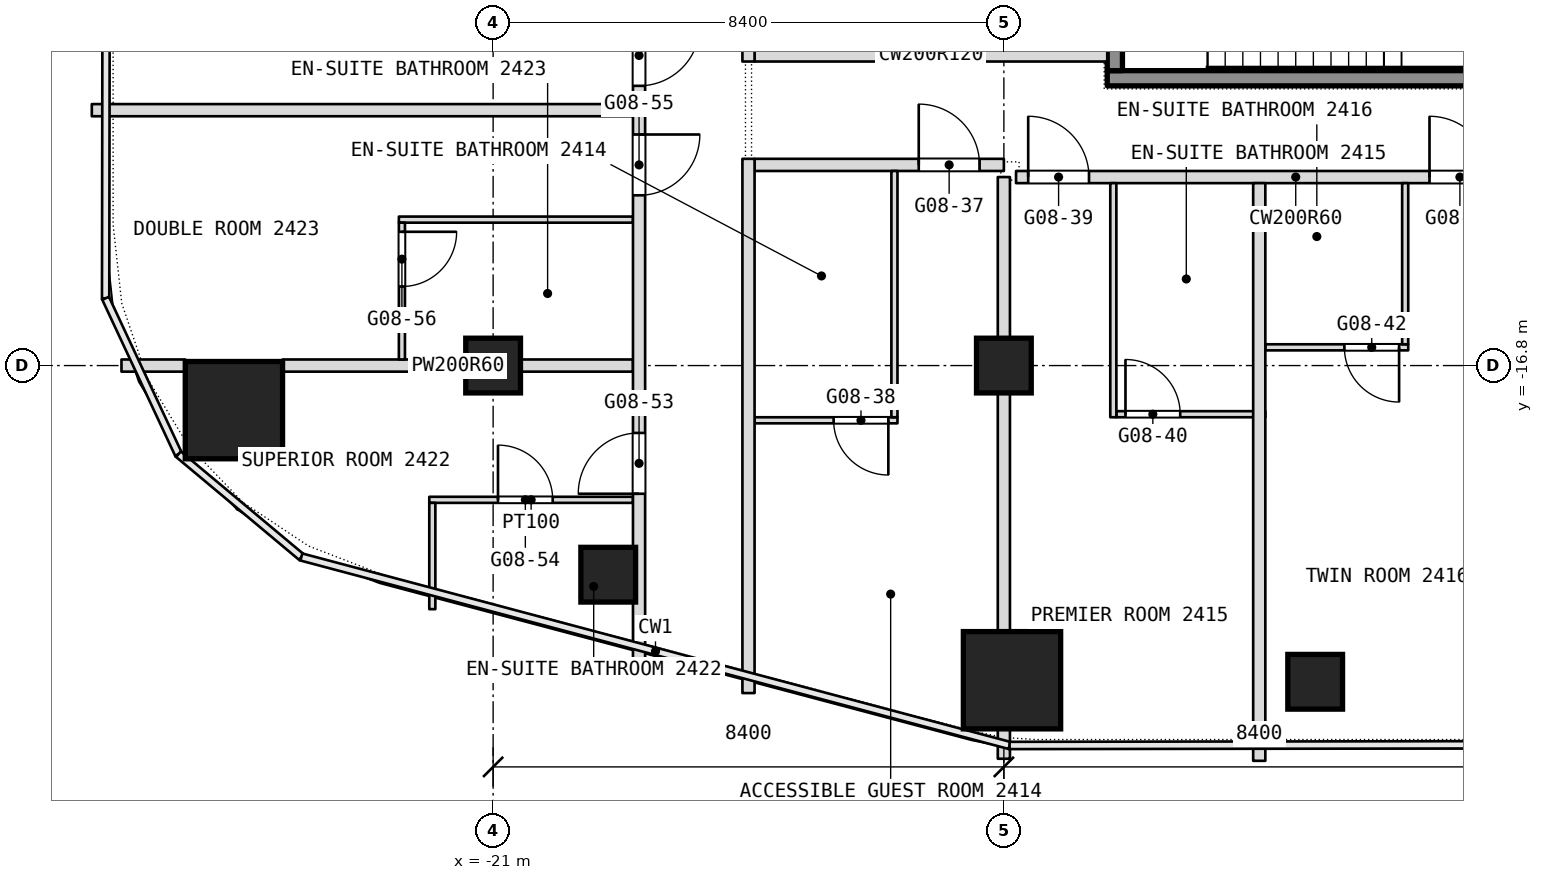
"""IFC4 building model, lengths in metres.
Left out: names, types, materials, properties, quantities, classifications, styles, units other than length and angle.
Written with IfcOpenShell. Run it as: python <this file> out.ifc"""

import sys

from ifc_helpers import new_model, si_unit, direction, frame, frame_2d, origin, origin_2d, place, context, subcontext, project, spatial, rectangle, extrude, element, fill, save


model = new_model("IFC4")
c1 = context("Model", 3, precision=1e-05, world=origin(), true_north=direction((0.0, 1.0)))
c2 = subcontext(c1, "Body", "Model", "MODEL_VIEW")
j1 = project(units=[si_unit("LENGTHUNIT", "METRE"), si_unit("PLANEANGLEUNIT", "RADIAN")], contexts=[c1])
p1 = place(None, origin())
s1 = spatial("IfcSite", under=j1, at=p1, CompositionType="ELEMENT")
p2 = place(p1, origin())
s2 = spatial("IfcBuilding", under=s1, at=p2, CompositionType="ELEMENT")
p3 = place(p2, frame((0.0, 0.0, 112.1)))
s3 = spatial("IfcBuildingStorey", under=s2, at=p3, CompositionType="ELEMENT", Elevation=112.1)
for number, where, z_axis, x_axis in (
    (1, (-25.263, -17.533, 0.0), (0.0, 0.0, 1.0), (1.0, 0.0, 0.0)),
    (2, (-12.466, -21.975, 0.0), (0.0, 0.0, 1.0), (1.0, 0.0, 0.0)),
):
    element("IfcColumn", number, at=place(p3, frame(where, z_axis=z_axis, x_axis=x_axis)), inside=s3, PredefinedType="COLUMN", context=c2, shape_type="SweptSolid", body=[
        extrude(rectangle(XDim=1.6, YDim=1.6, at=origin_2d()), origin(), (0.0, 0.0, 1.0), 3.6),
    ])
for number, where, z_axis, x_axis in (
    (3, (-21.0, -16.8, 0.0), (0.0, 0.0, 1.0), (1.0, 0.0, 0.0)),
    (4, (-12.6, -16.8, 0.0), (0.0, 0.0, 1.0), (1.0, 0.0, 0.0)),
    (5, (-7.48, -22.0, 0.0), (0.0, 0.0, 1.0), (1.0, 0.0, 0.0)),
    (6, (-19.107, -20.239, 0.0), (0.0, 0.0, 1.0), (1.0, 0.0, 0.0)),
):
    element("IfcColumn", number, at=place(p3, frame(where, z_axis=z_axis, x_axis=x_axis)), inside=s3, PredefinedType="COLUMN", context=c2, shape_type="SweptSolid", body=[
        extrude(rectangle(XDim=0.9, YDim=0.9, at=origin_2d()), origin(), (0.0, 0.0, 1.0), 3.6),
    ])
p4 = place(p3, frame((-22.05, -19.008, 0.0), z_axis=(0.0, 0.0, 1.0), x_axis=(1.0, 0.0, 0.0)))
e7 = element("IfcWall", 7, at=p4, inside=s3, PredefinedType="PARTITIONING", context=c2, shape_type="SweptSolid", body=[
    extrude(rectangle(XDim=3.35, YDim=0.1, at=frame_2d((1.675, 0.0))), origin(), (0.0, 0.0, 1.0), 3.34),
])
p5 = place(p4, frame((1.13, 0.0, 0.0)))
e8 = element("IfcOpeningElement", 8, at=p5, cuts=e7, PredefinedType="OPENING", context=c2, shape_type="SweptSolid", body=[
    extrude(rectangle(XDim=0.9, YDim=2.1, at=frame_2d((0.45, 1.05))), frame((0.0, 0.05, 0.0), z_axis=(0.0, -1.0, 0.0), x_axis=(1.0, 0.0, 0.0)), (0.0, 0.0, 1.0), 0.1),
])
p6 = place(p3, frame((-16.7, -17.7, 0.0), z_axis=(0.0, 0.0, 1.0), x_axis=(1.0, 0.0, 0.0)))
e9 = element("IfcWall", 9, at=p6, inside=s3, PredefinedType="PARTITIONING", context=c2, shape_type="SweptSolid", body=[
    extrude(rectangle(XDim=2.35, YDim=0.1, at=frame_2d((1.175, 0.0))), origin(), (0.0, 0.0, 1.0), 3.34),
])
p7 = place(p6, frame((1.3, 0.0, 0.0)))
e10 = element("IfcOpeningElement", 10, at=p7, cuts=e9, PredefinedType="OPENING", context=c2, shape_type="SweptSolid", body=[
    extrude(rectangle(XDim=0.9, YDim=2.1, at=frame_2d((0.45, 1.05))), frame((0.0, 0.05, 0.0), z_axis=(0.0, -1.0, 0.0), x_axis=(1.0, 0.0, 0.0)), (0.0, 0.0, 1.0), 0.1),
])
p8 = place(p3, frame((-10.75, -17.6, 0.0), z_axis=(0.0, 0.0, 1.0), x_axis=(1.0, 0.0, 0.0)))
e11 = element("IfcWall", 11, at=p8, inside=s3, PredefinedType="PARTITIONING", context=c2, shape_type="SweptSolid", body=[
    extrude(rectangle(XDim=2.45, YDim=0.1, at=frame_2d((1.225, 0.0))), origin(), (0.0, 0.0, 1.0), 3.34),
])
p9 = place(p8, frame((0.15, 0.0, 0.0)))
e12 = element("IfcOpeningElement", 12, at=p9, cuts=e11, PredefinedType="OPENING", context=c2, shape_type="SweptSolid", body=[
    extrude(rectangle(XDim=0.9, YDim=2.1, at=frame_2d((0.45, 1.05))), frame((0.0, 0.05, 0.0), z_axis=(0.0, -1.0, 0.0), x_axis=(1.0, 0.0, 0.0)), (0.0, 0.0, 1.0), 0.1),
])
p10 = place(p3, frame((-27.112, -16.8, 0.0), z_axis=(0.0, 0.0, 1.0), x_axis=(1.0, 0.0, 0.0)))
e13 = element("IfcWall", 13, at=p10, inside=s3, PredefinedType="PARTITIONING", context=c2, shape_type="SweptSolid", body=[
    extrude(rectangle(XDim=1.049, YDim=0.2, at=frame_2d((0.524, 0.0))), origin(), (0.0, 0.0, 1.0), 3.34),
])
p11 = place(p3, frame((-24.463, -16.8, 0.0), z_axis=(0.0, 0.0, 1.0), x_axis=(1.0, 0.0, 0.0)))
e14 = element("IfcWall", 14, at=p11, inside=s3, PredefinedType="PARTITIONING", context=c2, shape_type="SweptSolid", body=[
    extrude(rectangle(XDim=5.763, YDim=0.2, at=frame_2d((2.881, 0.0))), origin(), (0.0, 0.0, 1.0), 2.89),
])
p12 = place(p3, frame((-8.3, -16.5, 0.0), z_axis=(0.0, 0.0, 1.0), x_axis=(1.0, 0.0, 0.0)))
e15 = element("IfcWall", 15, at=p12, inside=s3, PredefinedType="PARTITIONING", context=c2, shape_type="SweptSolid", body=[
    extrude(rectangle(XDim=2.35, YDim=0.1, at=frame_2d((1.175, 0.0))), origin(), (0.0, 0.0, 1.0), 3.34),
])
p13 = place(p12, frame((1.3, 0.0, 0.0)))
e16 = element("IfcOpeningElement", 16, at=p13, cuts=e15, PredefinedType="OPENING", context=c2, shape_type="SweptSolid", body=[
    extrude(rectangle(XDim=0.9, YDim=2.1, at=frame_2d((0.45, 1.05))), frame((0.0, 0.05, 0.0), z_axis=(0.0, -1.0, 0.0), x_axis=(1.0, 0.0, 0.0)), (0.0, 0.0, 1.0), 0.1),
])
p14 = place(p3, frame((-22.55, -14.4, 0.0), z_axis=(0.0, 0.0, 1.0), x_axis=(1.0, 0.0, 0.0)))
e17 = element("IfcWall", 17, at=p14, inside=s3, PredefinedType="PARTITIONING", context=c2, shape_type="SweptSolid", body=[
    extrude(rectangle(XDim=3.85, YDim=0.1, at=frame_2d((1.925, 0.0))), origin(), (0.0, 0.0, 1.0), 3.34),
])
p15 = place(p3, frame((-12.4, -13.7, 0.0), z_axis=(0.0, 0.0, 1.0), x_axis=(1.0, 0.0, 0.0)))
e18 = element("IfcWall", 18, at=p15, inside=s3, PredefinedType="PARTITIONING", context=c2, shape_type="SweptSolid", body=[
    extrude(rectangle(XDim=9.2, YDim=0.2, at=frame_2d((4.6, 0.0))), origin(), (0.0, 0.0, 1.0), 3.34),
])
p16 = place(p15, frame((0.2, 0.0, 0.0)))
e19 = element("IfcOpeningElement", 19, at=p16, cuts=e18, PredefinedType="OPENING", context=c2, shape_type="SweptSolid", body=[
    extrude(rectangle(XDim=1.0, YDim=2.1, at=frame_2d((0.5, 1.05))), frame((0.0, 0.1, 0.0), z_axis=(0.0, -1.0, 0.0), x_axis=(1.0, 0.0, 0.0)), (0.0, 0.0, 1.0), 0.2),
])
p17 = place(p15, frame((6.8, 0.0, 0.0)))
e20 = element("IfcOpeningElement", 20, at=p17, cuts=e18, PredefinedType="OPENING", context=c2, shape_type="SweptSolid", body=[
    extrude(rectangle(XDim=1.0, YDim=2.1, at=frame_2d((0.5, 1.05))), frame((0.0, 0.1, 0.0), z_axis=(0.0, -1.0, 0.0), x_axis=(1.0, 0.0, 0.0)), (0.0, 0.0, 1.0), 0.2),
])
p18 = place(p3, frame((-16.7, -13.5, 0.0), z_axis=(0.0, 0.0, 1.0), x_axis=(1.0, 0.0, 0.0)))
e21 = element("IfcWall", 21, at=p18, inside=s3, PredefinedType="PARTITIONING", context=c2, shape_type="SweptSolid", body=[
    extrude(rectangle(XDim=4.1, YDim=0.2, at=frame_2d((2.05, 0.0))), origin(), (0.0, 0.0, 1.0), 3.34),
])
p19 = place(p18, frame((2.7, 0.0, 0.0)))
e22 = element("IfcOpeningElement", 22, at=p19, cuts=e21, PredefinedType="OPENING", context=c2, shape_type="SweptSolid", body=[
    extrude(rectangle(XDim=1.0, YDim=2.1, at=frame_2d((0.5, 1.05))), frame((0.0, 0.1, 0.0), z_axis=(0.0, -1.0, 0.0), x_axis=(1.0, 0.0, 0.0)), (0.0, 0.0, 1.0), 0.2),
])
p20 = place(p3, frame((-27.6, -12.6, 0.0), z_axis=(0.0, 0.0, 1.0), x_axis=(1.0, 0.0, 0.0)))
e23 = element("IfcWall", 23, at=p20, inside=s3, PredefinedType="PARTITIONING", context=c2, shape_type="SweptSolid", body=[
    extrude(rectangle(XDim=8.9, YDim=0.2, at=frame_2d((4.45, 0.0))), origin(), (0.0, 0.0, 1.0), 3.34),
])
p21 = place(p3, frame((-16.7, -11.7, 0.0), z_axis=(0.0, 0.0, 1.0), x_axis=(1.0, 0.0, 0.0)))
e24 = element("IfcWall", 24, at=p21, inside=s3, PredefinedType="PARTITIONING", context=c2, shape_type="SweptSolid", body=[
    extrude(rectangle(XDim=5.8, YDim=0.2, at=frame_2d((2.9, 0.0))), origin(), (0.0, 0.0, 1.0), 3.34),
])
p22 = place(p3, frame((-6.0, -16.45, 0.0), z_axis=(0.0, 0.0, 1.0), x_axis=(0.0, 1.0, 0.0)))
e25 = element("IfcWall", 25, at=p22, inside=s3, PredefinedType="PARTITIONING", context=c2, shape_type="SweptSolid", body=[
    extrude(rectangle(XDim=2.65, YDim=0.1, at=frame_2d((1.325, 0.0))), origin(), (0.0, 0.0, 1.0), 3.34),
])
p23 = place(p3, frame((-8.4, -23.3, 0.0), z_axis=(0.0, 0.0, 1.0), x_axis=(0.0, 1.0, 0.0)))
e26 = element("IfcWall", 26, at=p23, inside=s3, PredefinedType="PARTITIONING", context=c2, shape_type="SweptSolid", body=[
    extrude(rectangle(XDim=9.5, YDim=0.2, at=frame_2d((4.75, 0.0))), origin(), (0.0, 0.0, 1.0), 3.34),
])
p24 = place(p3, frame((-10.8, -17.65, 0.0), z_axis=(0.0, 0.0, 1.0), x_axis=(0.0, 1.0, 0.0)))
e27 = element("IfcWall", 27, at=p24, inside=s3, PredefinedType="PARTITIONING", context=c2, shape_type="SweptSolid", body=[
    extrude(rectangle(XDim=3.85, YDim=0.1, at=frame_2d((1.925, 0.0))), origin(), (0.0, 0.0, 1.0), 3.34),
])
p25 = place(p3, frame((-12.6, -23.266, 0.0), z_axis=(0.0, 0.0, 1.0), x_axis=(0.0, 1.0, 0.0)))
e28 = element("IfcWall", 28, at=p25, inside=s3, PredefinedType="PARTITIONING", context=c2, shape_type="SweptSolid", body=[
    extrude(rectangle(XDim=0.491, YDim=0.2, at=frame_2d((0.246, 0.0))), origin(), (0.0, 0.0, 1.0), 3.34),
])
p26 = place(p3, frame((-12.6, -21.175, 0.0), z_axis=(0.0, 0.0, 1.0), x_axis=(0.0, 1.0, 0.0)))
e29 = element("IfcWall", 29, at=p26, inside=s3, PredefinedType="PARTITIONING", context=c2, shape_type="SweptSolid", body=[
    extrude(rectangle(XDim=7.475, YDim=0.2, at=frame_2d((3.738, 0.0))), origin(), (0.0, 0.0, 1.0), 3.34),
])
p27 = place(p3, frame((-14.4, -17.65, 0.0), z_axis=(0.0, 0.0, 1.0), x_axis=(0.0, 1.0, 0.0)))
e30 = element("IfcWall", 30, at=p27, inside=s3, PredefinedType="PARTITIONING", context=c2, shape_type="SweptSolid", body=[
    extrude(rectangle(XDim=4.05, YDim=0.1, at=frame_2d((2.025, 0.0))), origin(), (0.0, 0.0, 1.0), 3.34),
])
p28 = place(p3, frame((-16.8, -22.186, 0.0), z_axis=(0.0, 0.0, 1.0), x_axis=(0.0, 1.0, 0.0)))
e31 = element("IfcWall", 31, at=p28, inside=s3, PredefinedType="PARTITIONING", context=c2, shape_type="SweptSolid", body=[
    extrude(rectangle(XDim=8.786, YDim=0.2, at=frame_2d((4.393, 0.0))), origin(), (0.0, 0.0, 1.0), 3.34),
])
p29 = place(p3, frame((-16.8, -11.8, 0.0), z_axis=(0.0, 0.0, 1.0), x_axis=(0.0, 1.0, 0.0)))
e32 = element("IfcWall", 32, at=p29, inside=s3, PredefinedType="PARTITIONING", context=c2, shape_type="SweptSolid", body=[
    extrude(rectangle(XDim=9.9, YDim=0.2, at=frame_2d((4.95, 0.0))), origin(), (0.0, 0.0, 1.0), 3.34),
])
p30 = place(p3, frame((-18.6, -21.708, 0.0), z_axis=(0.0, 0.0, 1.0), x_axis=(0.0, 1.0, 0.0)))
e33 = element("IfcWall", 33, at=p30, inside=s3, PredefinedType="PARTITIONING", context=c2, shape_type="SweptSolid", body=[
    extrude(rectangle(XDim=28.608, YDim=0.2, at=frame_2d((14.304, 0.0))), origin(), (0.0, 0.0, 1.0), 3.34),
])
p31 = place(p30, frame((2.8, 0.0, 0.0)))
e34 = element("IfcOpeningElement", 34, at=p31, cuts=e33, PredefinedType="OPENING", context=c2, shape_type="SweptSolid", body=[
    extrude(rectangle(XDim=1.0, YDim=2.1, at=frame_2d((0.5, 1.05))), frame((0.0, 0.1, 0.0), z_axis=(0.0, -1.0, 0.0), x_axis=(1.0, 0.0, 0.0)), (0.0, 0.0, 1.0), 0.2),
])
p32 = place(p30, frame((7.708, 0.0, 0.0)))
e35 = element("IfcOpeningElement", 35, at=p32, cuts=e33, PredefinedType="OPENING", context=c2, shape_type="SweptSolid", body=[
    extrude(rectangle(XDim=1.0, YDim=2.1, at=frame_2d((0.5, 1.05))), frame((0.0, 0.1, 0.0), z_axis=(0.0, -1.0, 0.0), x_axis=(1.0, 0.0, 0.0)), (0.0, 0.0, 1.0), 0.2),
])
p33 = place(p30, frame((9.508, 0.0, 0.0)))
e36 = element("IfcOpeningElement", 36, at=p33, cuts=e33, PredefinedType="OPENING", context=c2, shape_type="SweptSolid", body=[
    extrude(rectangle(XDim=1.0, YDim=2.1, at=frame_2d((0.5, 1.05))), frame((0.0, 0.1, 0.0), z_axis=(0.0, -1.0, 0.0), x_axis=(1.0, 0.0, 0.0)), (0.0, 0.0, 1.0), 0.2),
])
p34 = place(p30, frame((13.708, 0.0, 0.0)))
e37 = element("IfcOpeningElement", 37, at=p34, cuts=e33, PredefinedType="OPENING", context=c2, shape_type="SweptSolid", body=[
    extrude(rectangle(XDim=1.0, YDim=2.1, at=frame_2d((0.5, 1.05))), frame((0.0, 0.1, 0.0), z_axis=(0.0, -1.0, 0.0), x_axis=(1.0, 0.0, 0.0)), (0.0, 0.0, 1.0), 0.2),
])
p35 = place(p30, frame((20.308, 0.0, 0.0)))
e38 = element("IfcOpeningElement", 38, at=p35, cuts=e33, PredefinedType="OPENING", context=c2, shape_type="SweptSolid", body=[
    extrude(rectangle(XDim=1.0, YDim=2.1, at=frame_2d((0.5, 1.05))), frame((0.0, 0.1, 0.0), z_axis=(0.0, -1.0, 0.0), x_axis=(1.0, 0.0, 0.0)), (0.0, 0.0, 1.0), 0.2),
])
p36 = place(p30, frame((24.508, 0.0, 0.0)))
e39 = element("IfcOpeningElement", 39, at=p36, cuts=e33, PredefinedType="OPENING", context=c2, shape_type="SweptSolid", body=[
    extrude(rectangle(XDim=1.0, YDim=2.1, at=frame_2d((0.5, 1.05))), frame((0.0, 0.1, 0.0), z_axis=(0.0, -1.0, 0.0), x_axis=(1.0, 0.0, 0.0)), (0.0, 0.0, 1.0), 0.2),
])
p37 = place(p3, frame((-22.0, -20.806, 0.0), z_axis=(0.0, 0.0, 1.0), x_axis=(0.0, 1.0, 0.0)))
e40 = element("IfcWall", 40, at=p37, inside=s3, PredefinedType="PARTITIONING", context=c2, shape_type="SweptSolid", body=[
    extrude(rectangle(XDim=1.748, YDim=0.1, at=frame_2d((0.874, 0.0))), origin(), (0.0, 0.0, 1.0), 3.34),
])
p38 = place(p3, frame((-22.5, -16.7, 0.0), z_axis=(0.0, 0.0, 1.0), x_axis=(0.0, 1.0, 0.0)))
e41 = element("IfcWall", 41, at=p38, inside=s3, PredefinedType="PARTITIONING", context=c2, shape_type="SweptSolid", body=[
    extrude(rectangle(XDim=2.25, YDim=0.1, at=frame_2d((1.125, 0.0))), origin(), (0.0, 0.0, 1.0), 3.34),
])
p39 = place(p38, frame((1.2, 0.0, 0.0)))
e42 = element("IfcOpeningElement", 42, at=p39, cuts=e41, PredefinedType="OPENING", context=c2, shape_type="SweptSolid", body=[
    extrude(rectangle(XDim=0.9, YDim=2.1, at=frame_2d((0.45, 1.05))), frame((0.0, 0.05, 0.0), z_axis=(0.0, -1.0, 0.0), x_axis=(1.0, 0.0, 0.0)), (0.0, 0.0, 1.0), 0.1),
])
p40 = place(p3, frame((-10.9, -12.075, 0.1), z_axis=(0.0, 0.0, 1.0), x_axis=(1.0, 0.0, 0.0)))
e43 = element("IfcWall", 43, at=p40, inside=s3, PredefinedType="SHEAR", context=c2, shape_type="SweptSolid", body=[
    extrude(rectangle(XDim=6.2, YDim=0.25, at=frame_2d((3.1, 0.0))), origin(), (0.0, 0.0, 1.0), 3.6),
])
p41 = place(p3, frame((-10.775, -11.95, 0.1), z_axis=(0.0, 0.0, 1.0), x_axis=(0.0, 1.0, 0.0)))
e44 = element("IfcWall", 44, at=p41, inside=s3, PredefinedType="SHEAR", context=c2, shape_type="SweptSolid", body=[
    extrude(rectangle(XDim=2.9, YDim=0.25, at=frame_2d((1.45, 0.0))), origin(), (0.0, 0.0, 1.0), 3.6),
])
p42 = place(p5, origin())
e45 = element("IfcDoor", 45, at=p42, inside=s3, OperationType="SINGLE_SWING_LEFT", PredefinedType="DOOR", context=c2, shape_type="SweptSolid", body=[
    extrude(rectangle(XDim=0.9, YDim=2.1, at=frame_2d((0.45, 1.05))), frame((0.0, 0.025, 0.0), z_axis=(0.0, -1.0, 0.0), x_axis=(1.0, 0.0, 0.0)), (0.0, 0.0, 1.0), 0.05),
])
fill(e8, e45)
p43 = place(p7, origin())
e46 = element("IfcDoor", 46, at=p43, inside=s3, OperationType="SINGLE_SWING_RIGHT", PredefinedType="DOOR", context=c2, shape_type="SweptSolid", body=[
    extrude(rectangle(XDim=0.9, YDim=2.1, at=frame_2d((0.45, 1.05))), frame((0.0, 0.025, 0.0), z_axis=(0.0, -1.0, 0.0), x_axis=(1.0, 0.0, 0.0)), (0.0, 0.0, 1.0), 0.05),
])
fill(e10, e46)
p44 = place(p9, origin())
e47 = element("IfcDoor", 47, at=p44, inside=s3, OperationType="SINGLE_SWING_LEFT", PredefinedType="DOOR", context=c2, shape_type="SweptSolid", body=[
    extrude(rectangle(XDim=0.9, YDim=2.1, at=frame_2d((0.45, 1.05))), frame((0.0, 0.025, 0.0), z_axis=(0.0, -1.0, 0.0), x_axis=(1.0, 0.0, 0.0)), (0.0, 0.0, 1.0), 0.05),
])
fill(e12, e47)
p45 = place(p13, origin())
e48 = element("IfcDoor", 48, at=p45, inside=s3, OperationType="SINGLE_SWING_RIGHT", PredefinedType="DOOR", context=c2, shape_type="SweptSolid", body=[
    extrude(rectangle(XDim=0.9, YDim=2.1, at=frame_2d((0.45, 1.05))), frame((0.0, 0.025, 0.0), z_axis=(0.0, -1.0, 0.0), x_axis=(1.0, 0.0, 0.0)), (0.0, 0.0, 1.0), 0.05),
])
fill(e16, e48)
p46 = place(p16, origin())
e49 = element("IfcDoor", 49, at=p46, inside=s3, OperationType="SINGLE_SWING_RIGHT", PredefinedType="DOOR", context=c2, shape_type="SweptSolid", body=[
    extrude(rectangle(XDim=1.0, YDim=2.1, at=frame_2d((0.5, 1.05))), frame((0.0, 0.025, 0.0), z_axis=(0.0, -1.0, 0.0), x_axis=(1.0, 0.0, 0.0)), (0.0, 0.0, 1.0), 0.05),
])
fill(e19, e49)
p47 = place(p17, origin())
e50 = element("IfcDoor", 50, at=p47, inside=s3, OperationType="SINGLE_SWING_LEFT", PredefinedType="DOOR", context=c2, shape_type="SweptSolid", body=[
    extrude(rectangle(XDim=1.0, YDim=2.1, at=frame_2d((0.5, 1.05))), frame((0.0, 0.025, 0.0), z_axis=(0.0, -1.0, 0.0), x_axis=(1.0, 0.0, 0.0)), (0.0, 0.0, 1.0), 0.05),
])
fill(e20, e50)
p48 = place(p19, origin())
e51 = element("IfcDoor", 51, at=p48, inside=s3, OperationType="SINGLE_SWING_LEFT", PredefinedType="DOOR", context=c2, shape_type="SweptSolid", body=[
    extrude(rectangle(XDim=1.0, YDim=2.1, at=frame_2d((0.5, 1.05))), frame((0.0, 0.025, 0.0), z_axis=(0.0, -1.0, 0.0), x_axis=(1.0, 0.0, 0.0)), (0.0, 0.0, 1.0), 0.05),
])
fill(e22, e51)
p49 = place(p31, origin())
e52 = element("IfcDoor", 52, at=p49, inside=s3, OperationType="SINGLE_SWING_LEFT", PredefinedType="DOOR", context=c2, shape_type="SweptSolid", body=[
    extrude(rectangle(XDim=1.0, YDim=2.1, at=frame_2d((0.5, 1.05))), frame((0.0, 0.025, 0.0), z_axis=(0.0, -1.0, 0.0), x_axis=(1.0, 0.0, 0.0)), (0.0, 0.0, 1.0), 0.05),
])
fill(e34, e52)
p50 = place(p32, origin())
e53 = element("IfcDoor", 53, at=p50, inside=s3, OperationType="SINGLE_SWING_RIGHT", PredefinedType="DOOR", context=c2, shape_type="SweptSolid", body=[
    extrude(rectangle(XDim=1.0, YDim=2.1, at=frame_2d((0.5, 1.05))), frame((0.0, 0.025, 0.0), z_axis=(0.0, -1.0, 0.0), x_axis=(1.0, 0.0, 0.0)), (0.0, 0.0, 1.0), 0.05),
])
fill(e35, e53)
p51 = place(p33, origin())
e54 = element("IfcDoor", 54, at=p51, inside=s3, OperationType="SINGLE_SWING_RIGHT", PredefinedType="DOOR", context=c2, shape_type="SweptSolid", body=[
    extrude(rectangle(XDim=1.0, YDim=2.1, at=frame_2d((0.5, 1.05))), frame((0.0, 0.025, 0.0), z_axis=(0.0, -1.0, 0.0), x_axis=(1.0, 0.0, 0.0)), (0.0, 0.0, 1.0), 0.05),
])
fill(e36, e54)
p52 = place(p39, origin())
e55 = element("IfcDoor", 55, at=p52, inside=s3, OperationType="SINGLE_SWING_LEFT", PredefinedType="DOOR", context=c2, shape_type="SweptSolid", body=[
    extrude(rectangle(XDim=0.9, YDim=2.1, at=frame_2d((0.45, 1.05))), frame((0.0, 0.025, 0.0), z_axis=(0.0, -1.0, 0.0), x_axis=(1.0, 0.0, 0.0)), (0.0, 0.0, 1.0), 0.05),
])
fill(e42, e55)
save(model, sys.argv[1])
